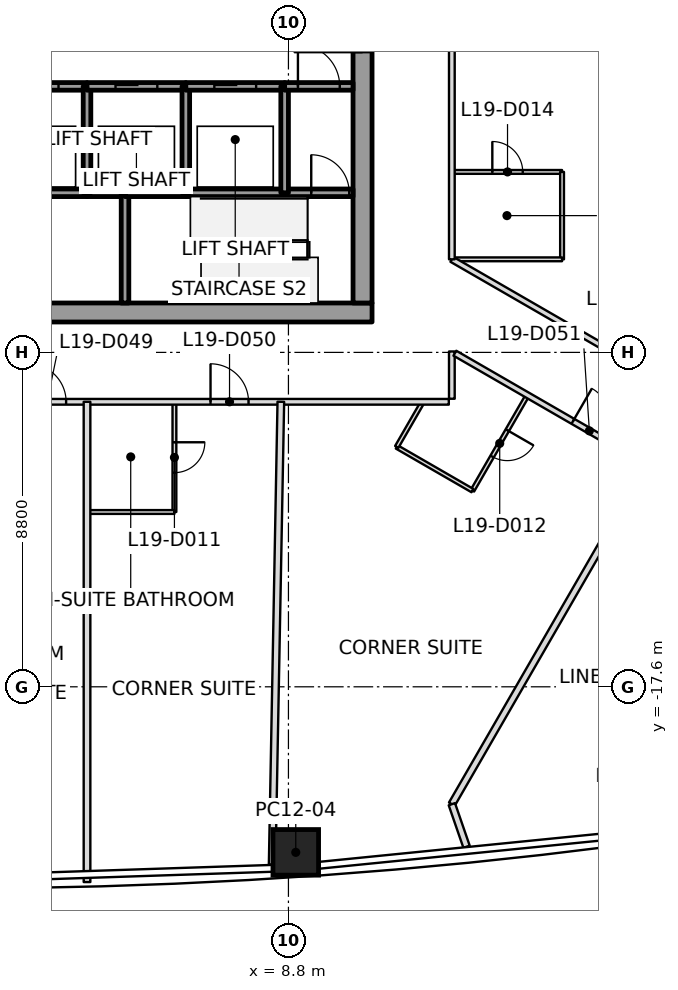
"""IFC4 building model, lengths in metres.
Left out: names, types, materials, properties, quantities, classifications, styles, units other than length and angle.
Written with IfcOpenShell. Run it as: python <this file> out.ifc"""

import sys

from ifc_helpers import new_model, si_unit, direction, frame, frame_2d, origin, origin_2d, place, context, subcontext, project, spatial, rectangle, extrude, element, fill, save


model = new_model("IFC4")
c1 = context("Model", 3, precision=1e-05, world=origin(), true_north=direction((0.0, 1.0)))
c2 = subcontext(c1, "Body", "Model", "MODEL_VIEW")
j1 = project(units=[si_unit("LENGTHUNIT", "METRE"), si_unit("PLANEANGLEUNIT", "RADIAN")], contexts=[c1])
p1 = place(None, origin())
s1 = spatial("IfcSite", under=j1, at=p1, CompositionType="ELEMENT")
p2 = place(p1, origin())
s2 = spatial("IfcBuilding", under=s1, at=p2, CompositionType="ELEMENT")
p3 = place(p2, frame((0.0, 0.0, 92.4)))
s3 = spatial("IfcBuildingStorey", under=s2, at=p3, CompositionType="ELEMENT", Elevation=92.4)
p4 = place(p3, frame((8.993, -21.957, 0.0), z_axis=(-0.009566025428, 0.012138956406, 0.999880561315), x_axis=(0.997745739106, 0.066536385186, 0.008737822466)))
e1 = element("IfcColumn", 1, at=p4, inside=s3, PredefinedType="COLUMN", context=c2, shape_type="SweptSolid", body=[
    extrude(rectangle(XDim=1.2, YDim=1.2, at=origin_2d()), origin(), (0.0, 0.0, 1.0), 3.701),
])
p5 = place(p3, frame((-11.0, -7.75, 0.0), z_axis=(0.0, 0.0, 1.0), x_axis=(1.0, 0.0, 0.0)))
e2 = element("IfcWall", 2, at=p5, inside=s3, PredefinedType="SHEAR", context=c2, shape_type="SweptSolid", body=[
    extrude(rectangle(XDim=22.0, YDim=0.5, at=frame_2d((11.0, 0.0))), origin(), (0.0, 0.0, 1.0), 3.7),
])
p6 = place(p5, frame((10.45, 0.0, 0.0)))
e3 = element("IfcOpeningElement", 3, at=p6, cuts=e2, PredefinedType="OPENING", context=c2, shape_type="SweptSolid", body=[
    extrude(rectangle(XDim=1.1, YDim=2.1, at=frame_2d((0.55, 1.05))), frame((0.0, 0.25, 0.0), z_axis=(0.0, -1.0, 0.0), x_axis=(1.0, 0.0, 0.0)), (0.0, 0.0, 1.0), 0.5),
])
p7 = place(p3, frame((10.75, -7.5, 0.0), z_axis=(0.0, 0.0, 1.0), x_axis=(0.0, 1.0, 0.0)))
e4 = element("IfcWall", 4, at=p7, inside=s3, PredefinedType="SHEAR", context=c2, shape_type="SweptSolid", body=[
    extrude(rectangle(XDim=15.0, YDim=0.5, at=frame_2d((7.5, 0.0))), origin(), (0.0, 0.0, 1.0), 3.7),
])
p8 = place(p7, frame((6.6, 0.0, 0.0)))
e5 = element("IfcOpeningElement", 5, at=p8, cuts=e4, PredefinedType="OPENING", context=c2, shape_type="SweptSolid", body=[
    extrude(rectangle(XDim=1.8, YDim=2.1, at=frame_2d((0.9, 1.05))), frame((0.0, 0.25, 0.0), z_axis=(0.0, -1.0, 0.0), x_axis=(1.0, 0.0, 0.0)), (0.0, 0.0, 1.0), 0.5),
])
p9 = place(p3, frame((0.9, -1.8, 0.0), z_axis=(0.0, 0.0, 1.0), x_axis=(1.0, 0.0, 0.0)))
e6 = element("IfcWall", 6, at=p9, inside=s3, PredefinedType="SOLIDWALL", context=c2, shape_type="SweptSolid", body=[
    extrude(rectangle(XDim=2.6, YDim=0.2, at=frame_2d((1.3, 0.0))), origin(), (0.0, 0.0, 1.0), 3.55),
])
p10 = place(p9, frame((0.75, 0.0, 0.0)))
e7 = element("IfcOpeningElement", 7, at=p10, cuts=e6, PredefinedType="OPENING", context=c2, shape_type="SweptSolid", body=[
    extrude(rectangle(XDim=1.1, YDim=2.1, at=frame_2d((0.55, 1.05))), frame((0.0, 0.1, 0.0), z_axis=(0.0, -1.0, 0.0), x_axis=(1.0, 0.0, 0.0)), (0.0, 0.0, 1.0), 0.2),
])
p11 = place(p3, frame((3.5, -4.6, 0.0), z_axis=(0.0, 0.0, 1.0), x_axis=(-1.0, 0.0, 0.0)))
e8 = element("IfcWall", 8, at=p11, inside=s3, PredefinedType="SOLIDWALL", context=c2, shape_type="SweptSolid", body=[
    extrude(rectangle(XDim=1.9, YDim=0.2, at=frame_2d((0.95, 0.0))), origin(), (0.0, 0.0, 1.0), 3.55),
])
p12 = place(p3, frame((4.5, -4.6, 0.0), z_axis=(0.0, 0.0, 1.0), x_axis=(-1.0, 0.0, 0.0)))
e9 = element("IfcWall", 9, at=p12, inside=s3, PredefinedType="SOLIDWALL", context=c2, shape_type="SweptSolid", body=[
    extrude(rectangle(XDim=1.0, YDim=0.2, at=frame_2d((0.5, 0.0))), origin(), (0.0, 0.0, 1.0), 3.55),
])
p13 = place(p3, frame((3.5, -4.6, 0.0), z_axis=(0.0, 0.0, 1.0), x_axis=(0.0, 1.0, 0.0)))
e10 = element("IfcWall", 10, at=p13, inside=s3, PredefinedType="SOLIDWALL", context=c2, shape_type="SweptSolid", body=[
    extrude(rectangle(XDim=2.8, YDim=0.2, at=frame_2d((1.4, 0.0))), origin(), (0.0, 0.0, 1.0), 3.55),
])
p14 = place(p3, frame((3.5, -1.8, 0.0), z_axis=(0.0, 0.0, 1.0), x_axis=(1.0, 0.0, 0.0)))
e11 = element("IfcWall", 11, at=p14, inside=s3, PredefinedType="SOLIDWALL", context=c2, shape_type="SweptSolid", body=[
    extrude(rectangle(XDim=2.6, YDim=0.2, at=frame_2d((1.3, 0.0))), origin(), (0.0, 0.0, 1.0), 3.55),
])
p15 = place(p14, frame((0.75, 0.0, 0.0)))
e12 = element("IfcOpeningElement", 12, at=p15, cuts=e11, PredefinedType="OPENING", context=c2, shape_type="SweptSolid", body=[
    extrude(rectangle(XDim=1.1, YDim=2.1, at=frame_2d((0.55, 1.05))), frame((0.0, 0.1, 0.0), z_axis=(0.0, -1.0, 0.0), x_axis=(1.0, 0.0, 0.0)), (0.0, 0.0, 1.0), 0.2),
])
p16 = place(p3, frame((4.5, -7.5, 0.0), z_axis=(0.0, 0.0, 1.0), x_axis=(0.0, 1.0, 0.0)))
e13 = element("IfcWall", 13, at=p16, inside=s3, PredefinedType="SOLIDWALL", context=c2, shape_type="SweptSolid", body=[
    extrude(rectangle(XDim=2.9, YDim=0.2, at=frame_2d((1.45, 0.0))), origin(), (0.0, 0.0, 1.0), 3.55),
])
p17 = place(p3, frame((4.5, -4.6, 0.0), z_axis=(0.0, 0.0, 1.0), x_axis=(1.0, 0.0, 0.0)))
e14 = element("IfcWall", 14, at=p17, inside=s3, PredefinedType="SOLIDWALL", context=c2, shape_type="SweptSolid", body=[
    extrude(rectangle(XDim=1.6, YDim=0.2, at=frame_2d((0.8, 0.0))), origin(), (0.0, 0.0, 1.0), 3.55),
])
p18 = place(p3, frame((6.1, -4.6, 0.0), z_axis=(0.0, 0.0, 1.0), x_axis=(1.0, 0.0, 0.0)))
e15 = element("IfcWall", 15, at=p18, inside=s3, PredefinedType="SOLIDWALL", context=c2, shape_type="SweptSolid", body=[
    extrude(rectangle(XDim=2.6, YDim=0.2, at=frame_2d((1.3, 0.0))), origin(), (0.0, 0.0, 1.0), 3.55),
])
p19 = place(p3, frame((6.1, -4.6, 0.0), z_axis=(0.0, 0.0, 1.0), x_axis=(0.0, 1.0, 0.0)))
e16 = element("IfcWall", 16, at=p19, inside=s3, PredefinedType="SOLIDWALL", context=c2, shape_type="SweptSolid", body=[
    extrude(rectangle(XDim=2.8, YDim=0.2, at=frame_2d((1.4, 0.0))), origin(), (0.0, 0.0, 1.0), 3.55),
])
p20 = place(p3, frame((6.1, -1.8, 0.0), z_axis=(0.0, 0.0, 1.0), x_axis=(1.0, 0.0, 0.0)))
e17 = element("IfcWall", 17, at=p20, inside=s3, PredefinedType="SOLIDWALL", context=c2, shape_type="SweptSolid", body=[
    extrude(rectangle(XDim=2.6, YDim=0.2, at=frame_2d((1.3, 0.0))), origin(), (0.0, 0.0, 1.0), 3.55),
])
p21 = place(p20, frame((0.75, 0.0, 0.0)))
e18 = element("IfcOpeningElement", 18, at=p21, cuts=e17, PredefinedType="OPENING", context=c2, shape_type="SweptSolid", body=[
    extrude(rectangle(XDim=1.1, YDim=2.1, at=frame_2d((0.55, 1.05))), frame((0.0, 0.1, 0.0), z_axis=(0.0, -1.0, 0.0), x_axis=(1.0, 0.0, 0.0)), (0.0, 0.0, 1.0), 0.2),
])
p22 = place(p3, frame((8.7, -4.6, 0.0), z_axis=(0.0, 0.0, 1.0), x_axis=(1.0, 0.0, 0.0)))
e19 = element("IfcWall", 19, at=p22, inside=s3, PredefinedType="SOLIDWALL", context=c2, shape_type="SweptSolid", body=[
    extrude(rectangle(XDim=1.8, YDim=0.2, at=frame_2d((0.9, 0.0))), origin(), (0.0, 0.0, 1.0), 3.55),
])
p23 = place(p22, frame((0.7, 0.0, 0.0)))
e20 = element("IfcOpeningElement", 20, at=p23, cuts=e19, PredefinedType="OPENING", context=c2, shape_type="SweptSolid", body=[
    extrude(rectangle(XDim=1.0, YDim=2.1, at=frame_2d((0.5, 1.05))), frame((0.0, 0.1, 0.0), z_axis=(0.0, -1.0, 0.0), x_axis=(1.0, 0.0, 0.0)), (0.0, 0.0, 1.0), 0.2),
])
p24 = place(p3, frame((8.7, -1.8, 0.0), z_axis=(0.0, 0.0, 1.0), x_axis=(0.0, -1.0, 0.0)))
e21 = element("IfcWall", 21, at=p24, inside=s3, PredefinedType="SOLIDWALL", context=c2, shape_type="SweptSolid", body=[
    extrude(rectangle(XDim=2.8, YDim=0.2, at=frame_2d((1.4, 0.0))), origin(), (0.0, 0.0, 1.0), 3.55),
])
p25 = place(p3, frame((8.7, -1.8, 0.0), z_axis=(0.0, 0.0, 1.0), x_axis=(1.0, 0.0, 0.0)))
e22 = element("IfcWall", 22, at=p25, inside=s3, PredefinedType="SOLIDWALL", context=c2, shape_type="SweptSolid", body=[
    extrude(rectangle(XDim=1.8, YDim=0.2, at=frame_2d((0.9, 0.0))), origin(), (0.0, 0.0, 1.0), 3.55),
])
p26 = place(p25, frame((0.35, 0.0, 0.0)))
e23 = element("IfcOpeningElement", 23, at=p26, cuts=e22, PredefinedType="OPENING", context=c2, shape_type="SweptSolid", body=[
    extrude(rectangle(XDim=1.1, YDim=2.1, at=frame_2d((0.55, 1.05))), frame((0.0, 0.1, 0.0), z_axis=(0.0, -1.0, 0.0), x_axis=(1.0, 0.0, 0.0)), (0.0, 0.0, 1.0), 0.2),
])
p27 = place(p3, frame((3.5, -10.1, 0.0), z_axis=(0.0, 0.0, 1.0), x_axis=(0.0, -1.0, 0.0)))
e24 = element("IfcWall", 24, at=p27, inside=s3, PredefinedType="PARTITIONING", context=c2, shape_type="SweptSolid", body=[
    extrude(rectangle(XDim=12.638, YDim=0.175, at=frame_2d((6.319, 0.0))), origin(), (0.0, 0.0, 1.0), 2.934),
])
p28 = place(p3, frame((8.6, -10.1, 0.0), z_axis=(0.0, 0.0, 1.0), x_axis=(-0.018722408453, -0.999824720349, 0.0)))
e25 = element("IfcWall", 25, at=p28, inside=s3, PredefinedType="PARTITIONING", context=c2, shape_type="SweptSolid", body=[
    extrude(rectangle(XDim=12.179, YDim=0.175, at=frame_2d((6.09, 0.0))), origin(), (0.0, 0.0, 1.0), 2.934),
])
p29 = place(p3, frame((18.259, -11.754, 0.0), z_axis=(0.0, 0.0, 1.0), x_axis=(-0.499994892108, -0.866028352807, 0.0)))
e26 = element("IfcWall", 26, at=p29, inside=s3, PredefinedType="PARTITIONING", context=c2, shape_type="SweptSolid", body=[
    extrude(rectangle(XDim=10.317, YDim=0.175, at=frame_2d((5.158, 0.0))), origin(), (0.0, 0.0, 1.0), 3.093),
])
p30 = place(p3, frame((13.1, -20.689, 0.0), z_axis=(0.0, 0.0, 1.0), x_axis=(0.326346225929, -0.94525030591, 0.0)))
e27 = element("IfcWall", 27, at=p30, inside=s3, PredefinedType="PARTITIONING", context=c2, shape_type="SweptSolid", body=[
    extrude(rectangle(XDim=1.185, YDim=0.175, at=frame_2d((0.593, 0.0))), origin(), (0.0, 0.0, 1.0), 2.934),
])
p31 = place(p3, frame((-13.02, -10.1, 0.0), z_axis=(0.0, 0.0, 1.0), x_axis=(1.0, 0.0, 0.0)))
e28 = element("IfcWall", 28, at=p31, inside=s3, PredefinedType="PARTITIONING", context=c2, shape_type="SweptSolid", body=[
    extrude(rectangle(XDim=26.04, YDim=0.15, at=frame_2d((13.02, 0.0))), origin(), (0.0, 0.0, 1.0), 2.947),
])
p32 = place(p31, frame((5.37, 0.0, 0.0)))
e29 = element("IfcOpeningElement", 29, at=p32, cuts=e28, PredefinedType="OPENING", context=c2, shape_type="SweptSolid", body=[
    extrude(rectangle(XDim=1.0, YDim=2.1, at=frame_2d((0.5, 1.05))), frame((0.0, 0.075, 0.0), z_axis=(0.0, -1.0, 0.0), x_axis=(1.0, 0.0, 0.0)), (0.0, 0.0, 1.0), 0.15),
])
p33 = place(p31, frame((10.17, 0.0, 0.0)))
e30 = element("IfcOpeningElement", 30, at=p33, cuts=e28, PredefinedType="OPENING", context=c2, shape_type="SweptSolid", body=[
    extrude(rectangle(XDim=1.0, YDim=2.1, at=frame_2d((0.5, 1.05))), frame((0.0, 0.075, 0.0), z_axis=(0.0, -1.0, 0.0), x_axis=(1.0, 0.0, 0.0)), (0.0, 0.0, 1.0), 0.15),
])
p34 = place(p31, frame((14.97, 0.0, 0.0)))
e31 = element("IfcOpeningElement", 31, at=p34, cuts=e28, PredefinedType="OPENING", context=c2, shape_type="SweptSolid", body=[
    extrude(rectangle(XDim=1.0, YDim=2.1, at=frame_2d((0.5, 1.05))), frame((0.0, 0.075, 0.0), z_axis=(0.0, -1.0, 0.0), x_axis=(1.0, 0.0, 0.0)), (0.0, 0.0, 1.0), 0.15),
])
p35 = place(p31, frame((19.77, 0.0, 0.0)))
e32 = element("IfcOpeningElement", 32, at=p35, cuts=e28, PredefinedType="OPENING", context=c2, shape_type="SweptSolid", body=[
    extrude(rectangle(XDim=1.0, YDim=2.1, at=frame_2d((0.5, 1.05))), frame((0.0, 0.075, 0.0), z_axis=(0.0, -1.0, 0.0), x_axis=(1.0, 0.0, 0.0)), (0.0, 0.0, 1.0), 0.15),
])
p36 = place(p3, frame((13.1, -10.02, 0.0), z_axis=(0.0, 0.0, 1.0), x_axis=(0.0, 1.0, 0.0)))
e33 = element("IfcWall", 33, at=p36, inside=s3, PredefinedType="PARTITIONING", context=c2, shape_type="SweptSolid", body=[
    extrude(rectangle(XDim=1.244, YDim=0.15, at=frame_2d((0.622, 0.0))), origin(), (0.0, 0.0, 1.0), 2.797),
])
p37 = place(p3, frame((13.179, -8.822, 0.0), z_axis=(0.0, 0.0, 1.0), x_axis=(0.866025889145, -0.499999159329, 0.0)))
e34 = element("IfcWall", 34, at=p37, inside=s3, PredefinedType="PARTITIONING", context=c2, shape_type="SweptSolid", body=[
    extrude(rectangle(XDim=10.285, YDim=0.15, at=frame_2d((5.143, 0.0))), origin(), (0.0, 0.0, 1.0), 2.797),
])
p38 = place(p37, frame((3.587, 0.0, 0.0)))
e35 = element("IfcOpeningElement", 35, at=p38, cuts=e34, PredefinedType="OPENING", context=c2, shape_type="SweptSolid", body=[
    extrude(rectangle(XDim=1.0, YDim=2.1, at=frame_2d((0.5, 1.05))), frame((0.0, 0.075, 0.0), z_axis=(0.0, -1.0, 0.0), x_axis=(1.0, 0.0, 0.0)), (0.0, 0.0, 1.0), 0.15),
])
p39 = place(p37, frame((7.615, 0.0, 0.0)))
e36 = element("IfcOpeningElement", 36, at=p39, cuts=e34, PredefinedType="OPENING", context=c2, shape_type="SweptSolid", body=[
    extrude(rectangle(XDim=1.0, YDim=2.1, at=frame_2d((0.5, 1.05))), frame((0.0, 0.075, 0.0), z_axis=(0.0, -1.0, 0.0), x_axis=(1.0, 0.0, 0.0)), (0.0, 0.0, 1.0), 0.15),
])
p40 = place(p3, frame((23.136, -12.145, 0.0), z_axis=(0.0, 0.0, 1.0), x_axis=(-0.866028069402, 0.499995382986, 0.0)))
e37 = element("IfcWall", 37, at=p40, inside=s3, PredefinedType="PARTITIONING", context=c2, shape_type="SweptSolid", body=[
    extrude(rectangle(XDim=11.589, YDim=0.15, at=frame_2d((5.794, 0.0))), origin(), (0.0, 0.0, 1.0), 2.947),
])
p41 = place(p40, frame((3.905, 0.0, 0.0)))
e38 = element("IfcOpeningElement", 38, at=p41, cuts=e37, PredefinedType="OPENING", context=c2, shape_type="SweptSolid", body=[
    extrude(rectangle(XDim=1.0, YDim=2.1, at=frame_2d((0.5, 1.05))), frame((0.0, 0.075, 0.0), z_axis=(0.0, -1.0, 0.0), x_axis=(1.0, 0.0, 0.0)), (0.0, 0.0, 1.0), 0.15),
])
p42 = place(p3, frame((13.1, -6.351, 0.0), z_axis=(0.0, 0.0, 1.0), x_axis=(0.0, 1.0, 0.0)))
e39 = element("IfcWall", 39, at=p42, inside=s3, PredefinedType="PARTITIONING", context=c2, shape_type="SweptSolid", body=[
    extrude(rectangle(XDim=16.371, YDim=0.15, at=frame_2d((8.186, 0.0))), origin(), (0.0, 0.0, 1.0), 2.947),
])
p43 = place(p42, frame((13.701, 0.0, 0.0)))
e40 = element("IfcOpeningElement", 40, at=p43, cuts=e39, PredefinedType="OPENING", context=c2, shape_type="SweptSolid", body=[
    extrude(rectangle(XDim=1.0, YDim=2.1, at=frame_2d((0.5, 1.05))), frame((0.0, 0.075, 0.0), z_axis=(0.0, -1.0, 0.0), x_axis=(1.0, 0.0, 0.0)), (0.0, 0.0, 1.0), 0.15),
])
p44 = place(p42, frame((6.676, 0.0, 0.0)))
e41 = element("IfcOpeningElement", 41, at=p44, cuts=e39, PredefinedType="OPENING", context=c2, shape_type="SweptSolid", body=[
    extrude(rectangle(XDim=1.0, YDim=2.1, at=frame_2d((0.5, 1.05))), frame((0.0, 0.075, 0.0), z_axis=(0.0, -1.0, 0.0), x_axis=(1.0, 0.0, 0.0)), (0.0, 0.0, 1.0), 0.15),
])
p45 = place(p3, frame((5.8, -10.13, 0.0), z_axis=(0.0, 0.0, 1.0), x_axis=(0.0, -1.0, 0.0)))
e42 = element("IfcWall", 42, at=p45, inside=s3, PredefinedType="PARTITIONING", context=c2, shape_type="SweptSolid", body=[
    extrude(rectangle(XDim=2.87, YDim=0.1, at=frame_2d((1.435, 0.0))), origin(), (0.0, 0.0, 1.0), 3.15),
])
p46 = place(p45, frame((1.035, 0.0, 0.0)))
e43 = element("IfcOpeningElement", 43, at=p46, cuts=e42, PredefinedType="OPENING", context=c2, shape_type="SweptSolid", body=[
    extrude(rectangle(XDim=0.8, YDim=2.1, at=frame_2d((0.4, 1.05))), frame((0.0, 0.05, 0.0), z_axis=(0.0, -1.0, 0.0), x_axis=(1.0, 0.0, 0.0)), (0.0, 0.0, 1.0), 0.1),
])
p47 = place(p3, frame((5.8, -13.0, 0.0), z_axis=(0.0, 0.0, 1.0), x_axis=(-1.0, 0.0, 0.0)))
e44 = element("IfcWall", 44, at=p47, inside=s3, PredefinedType="PARTITIONING", context=c2, shape_type="SweptSolid", body=[
    extrude(rectangle(XDim=2.27, YDim=0.1, at=frame_2d((1.135, 0.0))), origin(), (0.0, 0.0, 1.0), 3.017),
])
p48 = place(p3, frame((15.077, -9.952, 0.0), z_axis=(0.0, 0.0, 1.0), x_axis=(-0.499999802827, -0.866025517622, 0.0)))
e45 = element("IfcWall", 45, at=p48, inside=s3, PredefinedType="PARTITIONING", context=c2, shape_type="SweptSolid", body=[
    extrude(rectangle(XDim=2.87, YDim=0.1, at=frame_2d((1.435, 0.0))), origin(), (0.0, 0.0, 1.0), 2.797),
])
p49 = place(p48, frame((1.035, 0.0, 0.0)))
e46 = element("IfcOpeningElement", 46, at=p49, cuts=e45, PredefinedType="OPENING", context=c2, shape_type="SweptSolid", body=[
    extrude(rectangle(XDim=0.8, YDim=2.1, at=frame_2d((0.4, 1.05))), frame((0.0, 0.05, 0.0), z_axis=(0.0, -1.0, 0.0), x_axis=(1.0, 0.0, 0.0)), (0.0, 0.0, 1.0), 0.1),
])
p50 = place(p3, frame((13.642, -12.437, 0.0), z_axis=(0.0, 0.0, 1.0), x_axis=(-0.866007057882, 0.500031774688, 0.0)))
e47 = element("IfcWall", 47, at=p50, inside=s3, PredefinedType="PARTITIONING", context=c2, shape_type="SweptSolid", body=[
    extrude(rectangle(XDim=2.3, YDim=0.1, at=frame_2d((1.15, 0.0))), origin(), (0.0, 0.0, 1.0), 3.15),
])
p51 = place(p3, frame((11.65, -11.287, 0.0), z_axis=(0.0, 0.0, 1.0), x_axis=(0.500049290317, 0.865996944136, 0.0)))
e48 = element("IfcWall", 48, at=p51, inside=s3, PredefinedType="PARTITIONING", context=c2, shape_type="SweptSolid", body=[
    extrude(rectangle(XDim=1.336, YDim=0.1, at=frame_2d((0.668, 0.0))), origin(), (0.0, 0.0, 1.0), 3.15),
])
p52 = place(p3, frame((13.13, -4.051, 0.0), z_axis=(0.0, 0.0, 1.0), x_axis=(1.0, 0.0, 0.0)))
e49 = element("IfcWall", 49, at=p52, inside=s3, PredefinedType="PARTITIONING", context=c2, shape_type="SweptSolid", body=[
    extrude(rectangle(XDim=2.87, YDim=0.1, at=frame_2d((1.435, 0.0))), origin(), (0.0, 0.0, 1.0), 2.947),
])
p53 = place(p52, frame((1.035, 0.0, 0.0)))
e50 = element("IfcOpeningElement", 50, at=p53, cuts=e49, PredefinedType="OPENING", context=c2, shape_type="SweptSolid", body=[
    extrude(rectangle(XDim=0.8, YDim=2.1, at=frame_2d((0.4, 1.05))), frame((0.0, 0.05, 0.0), z_axis=(0.0, -1.0, 0.0), x_axis=(1.0, 0.0, 0.0)), (0.0, 0.0, 1.0), 0.1),
])
p54 = place(p3, frame((16.0, -4.051, 0.0), z_axis=(0.0, 0.0, 1.0), x_axis=(0.0, -1.0, 0.0)))
e51 = element("IfcWall", 51, at=p54, inside=s3, PredefinedType="PARTITIONING", context=c2, shape_type="SweptSolid", body=[
    extrude(rectangle(XDim=2.3, YDim=0.1, at=frame_2d((1.15, 0.0))), origin(), (0.0, 0.0, 1.0), 3.15),
])
p55 = place(p3, frame((16.0, -6.351, 0.0), z_axis=(0.0, 0.0, 1.0), x_axis=(-1.0, 0.0, 0.0)))
e52 = element("IfcWall", 52, at=p55, inside=s3, PredefinedType="PARTITIONING", context=c2, shape_type="SweptSolid", body=[
    extrude(rectangle(XDim=2.84, YDim=0.1, at=frame_2d((1.42, 0.0))), origin(), (0.0, 0.0, 1.0), 3.15),
])
p56 = place(p34, origin())
e53 = element("IfcDoor", 53, at=p56, inside=s3, OperationType="SINGLE_SWING_LEFT", PredefinedType="DOOR", context=c2, shape_type="SweptSolid", body=[
    extrude(rectangle(XDim=1.0, YDim=2.1, at=frame_2d((0.5, 1.05))), frame((0.0, 0.025, 0.0), z_axis=(0.0, -1.0, 0.0), x_axis=(1.0, 0.0, 0.0)), (0.0, 0.0, 1.0), 0.05),
])
fill(e31, e53)
p57 = place(p35, origin())
e54 = element("IfcDoor", 54, at=p57, inside=s3, OperationType="SINGLE_SWING_LEFT", PredefinedType="DOOR", context=c2, shape_type="SweptSolid", body=[
    extrude(rectangle(XDim=1.0, YDim=2.1, at=frame_2d((0.5, 1.05))), frame((0.0, 0.025, 0.0), z_axis=(0.0, -1.0, 0.0), x_axis=(1.0, 0.0, 0.0)), (0.0, 0.0, 1.0), 0.05),
])
fill(e32, e54)
p58 = place(p46, origin())
e55 = element("IfcDoor", 55, at=p58, inside=s3, OperationType="SINGLE_SWING_RIGHT", PredefinedType="DOOR", context=c2, shape_type="SweptSolid", body=[
    extrude(rectangle(XDim=0.8, YDim=2.1, at=frame_2d((0.4, 1.05))), frame((0.0, 0.025, 0.0), z_axis=(0.0, -1.0, 0.0), x_axis=(1.0, 0.0, 0.0)), (0.0, 0.0, 1.0), 0.05),
])
fill(e43, e55)
p59 = place(p38, origin())
e56 = element("IfcDoor", 56, at=p59, inside=s3, OperationType="SINGLE_SWING_LEFT", PredefinedType="DOOR", context=c2, shape_type="SweptSolid", body=[
    extrude(rectangle(XDim=1.0, YDim=2.1, at=frame_2d((0.5, 1.05))), frame((0.0, 0.025, 0.0), z_axis=(0.0, -1.0, 0.0), x_axis=(1.0, 0.0, 0.0)), (0.0, 0.0, 1.0), 0.05),
])
fill(e35, e56)
p60 = place(p49, origin())
e57 = element("IfcDoor", 57, at=p60, inside=s3, OperationType="SINGLE_SWING_RIGHT", PredefinedType="DOOR", context=c2, shape_type="SweptSolid", body=[
    extrude(rectangle(XDim=0.8, YDim=2.1, at=frame_2d((0.4, 1.05))), frame((0.0, 0.025, 0.0), z_axis=(0.0, -1.0, 0.0), x_axis=(1.0, 0.0, 0.0)), (0.0, 0.0, 1.0), 0.05),
])
fill(e46, e57)
p61 = place(p53, origin())
e58 = element("IfcDoor", 58, at=p61, inside=s3, OperationType="SINGLE_SWING_LEFT", PredefinedType="DOOR", context=c2, shape_type="SweptSolid", body=[
    extrude(rectangle(XDim=0.8, YDim=2.1, at=frame_2d((0.4, 1.05))), frame((0.0, 0.025, 0.0), z_axis=(0.0, -1.0, 0.0), x_axis=(1.0, 0.0, 0.0)), (0.0, 0.0, 1.0), 0.05),
])
fill(e50, e58)
p62 = place(p10, origin())
e59 = element("IfcDoor", 59, at=p62, inside=s3, OperationType="SLIDING_TO_RIGHT", PredefinedType="DOOR", context=c2, shape_type="SweptSolid", body=[
    extrude(rectangle(XDim=1.1, YDim=2.1, at=frame_2d((0.55, 1.05))), frame((0.0, 0.025, 0.0), z_axis=(0.0, -1.0, 0.0), x_axis=(1.0, 0.0, 0.0)), (0.0, 0.0, 1.0), 0.05),
])
fill(e7, e59)
p63 = place(p15, origin())
e60 = element("IfcDoor", 60, at=p63, inside=s3, OperationType="SLIDING_TO_RIGHT", PredefinedType="DOOR", context=c2, shape_type="SweptSolid", body=[
    extrude(rectangle(XDim=1.1, YDim=2.1, at=frame_2d((0.55, 1.05))), frame((0.0, 0.025, 0.0), z_axis=(0.0, -1.0, 0.0), x_axis=(1.0, 0.0, 0.0)), (0.0, 0.0, 1.0), 0.05),
])
fill(e12, e60)
p64 = place(p21, origin())
e61 = element("IfcDoor", 61, at=p64, inside=s3, OperationType="SLIDING_TO_LEFT", PredefinedType="DOOR", context=c2, shape_type="SweptSolid", body=[
    extrude(rectangle(XDim=1.1, YDim=2.1, at=frame_2d((0.55, 1.05))), frame((0.0, 0.025, 0.0), z_axis=(0.0, -1.0, 0.0), x_axis=(1.0, 0.0, 0.0)), (0.0, 0.0, 1.0), 0.05),
])
fill(e18, e61)
p65 = place(p26, origin())
e62 = element("IfcDoor", 62, at=p65, inside=s3, OperationType="SINGLE_SWING_RIGHT", PredefinedType="DOOR", context=c2, shape_type="SweptSolid", body=[
    extrude(rectangle(XDim=1.1, YDim=2.1, at=frame_2d((0.55, 1.05))), frame((0.0, 0.025, 0.0), z_axis=(0.0, -1.0, 0.0), x_axis=(1.0, 0.0, 0.0)), (0.0, 0.0, 1.0), 0.05),
])
fill(e23, e62)
p66 = place(p23, origin())
e63 = element("IfcDoor", 63, at=p66, inside=s3, OperationType="SINGLE_SWING_RIGHT", PredefinedType="DOOR", context=c2, shape_type="SweptSolid", body=[
    extrude(rectangle(XDim=1.0, YDim=2.1, at=frame_2d((0.5, 1.05))), frame((0.0, 0.025, 0.0), z_axis=(0.0, -1.0, 0.0), x_axis=(1.0, 0.0, 0.0)), (0.0, 0.0, 1.0), 0.05),
])
fill(e20, e63)
p67 = place(p8, origin())
e64 = element("IfcDoor", 64, at=p67, inside=s3, OperationType="DOUBLE_DOOR_SINGLE_SWING", PredefinedType="DOOR", context=c2, shape_type="SweptSolid", body=[
    extrude(rectangle(XDim=1.8, YDim=2.1, at=frame_2d((0.9, 1.05))), frame((0.0, 0.025, 0.0), z_axis=(0.0, -1.0, 0.0), x_axis=(1.0, 0.0, 0.0)), (0.0, 0.0, 1.0), 0.05),
])
fill(e5, e64)
save(model, sys.argv[1])
